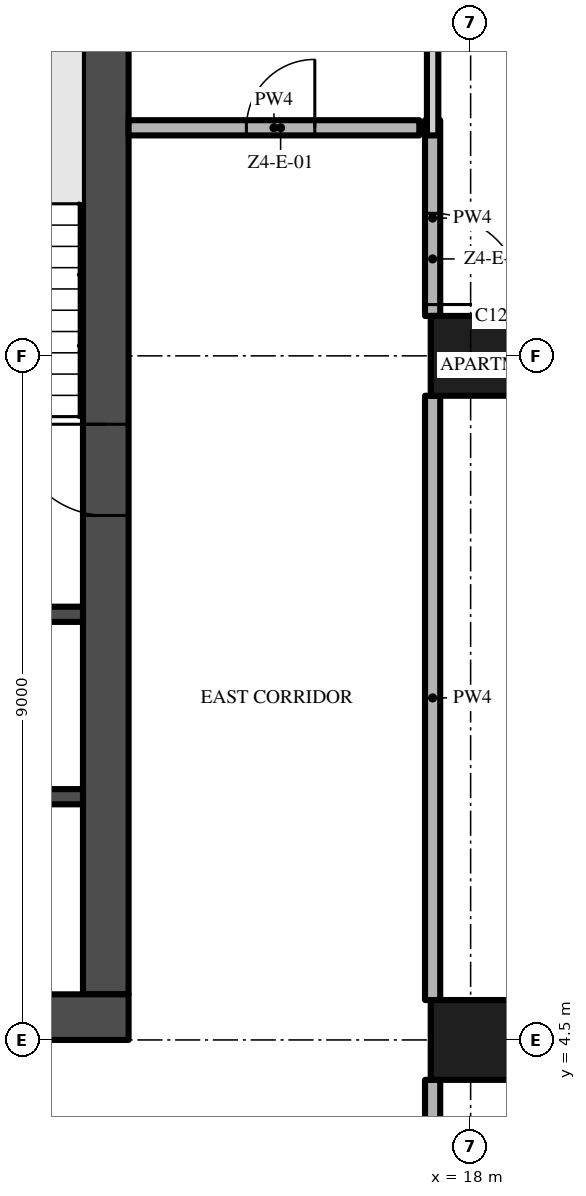
"""IFC4 building model, lengths in metres.
Left out: names, types, materials, properties, quantities, classifications, styles, units other than length and angle.
Written with IfcOpenShell. Run it as: python <this file> out.ifc"""

import sys

from ifc_helpers import new_model, si_unit, direction, frame, frame_2d, origin, origin_2d, place, context, subcontext, project, spatial, rectangle, extrude, element, fill, save


model = new_model("IFC4")
c1 = context("Model", 3, precision=1e-05, world=origin(), true_north=direction((0.0, 1.0)))
c2 = subcontext(c1, "Body", "Model", "MODEL_VIEW")
j1 = project(units=[si_unit("LENGTHUNIT", "METRE"), si_unit("PLANEANGLEUNIT", "RADIAN")], contexts=[c1])
p1 = place(None, origin())
s1 = spatial("IfcSite", under=j1, at=p1, CompositionType="ELEMENT")
p2 = place(p1, origin())
s2 = spatial("IfcBuilding", under=s1, at=p2, CompositionType="ELEMENT")
p3 = place(p2, frame((0.0, 0.0, 226.2)))
s3 = spatial("IfcBuildingStorey", under=s2, at=p3, CompositionType="ELEMENT", Elevation=226.2)
p4 = place(p3, frame((-13.5, 4.8, -0.3), z_axis=(0.0, 0.0, 1.0), x_axis=(1.0, 0.0, 0.0)))
e1 = element("IfcWall", 1, at=p4, inside=s3, PredefinedType="SHEAR", context=c2, shape_type="SweptSolid", body=[
    extrude(rectangle(XDim=27.0, YDim=0.6, at=frame_2d((13.5, 0.0))), origin(), (0.0, 0.0, 1.0), 3.8),
])
p5 = place(p4, frame((12.0, 0.0, 0.3)))
e2 = element("IfcOpeningElement", 2, at=p5, cuts=e1, PredefinedType="OPENING", context=c2, shape_type="SweptSolid", body=[
    extrude(rectangle(XDim=3.0, YDim=2.4, at=frame_2d((1.5, 1.2))), frame((0.0, 0.31, 0.0), z_axis=(0.0, -1.0, 0.0), x_axis=(1.0, 0.0, 0.0)), (0.0, 0.0, 1.0), 0.62),
])
p6 = place(p4, frame((4.9, 0.0, 0.3)))
e3 = element("IfcOpeningElement", 3, at=p6, cuts=e1, PredefinedType="OPENING", context=c2, shape_type="SweptSolid", body=[
    extrude(rectangle(XDim=1.2, YDim=2.2, at=frame_2d((0.6, 1.1))), frame((0.0, 0.31, 0.0), z_axis=(0.0, -1.0, 0.0), x_axis=(1.0, 0.0, 0.0)), (0.0, 0.0, 1.0), 0.62),
])
p7 = place(p4, frame((20.75, 0.0, 0.3)))
e4 = element("IfcOpeningElement", 4, at=p7, cuts=e1, PredefinedType="OPENING", context=c2, shape_type="SweptSolid", body=[
    extrude(rectangle(XDim=1.5, YDim=2.2, at=frame_2d((0.75, 1.1))), frame((0.0, 0.31, 0.0), z_axis=(0.0, -1.0, 0.0), x_axis=(1.0, 0.0, 0.0)), (0.0, 0.0, 1.0), 0.62),
])
p8 = place(p4, frame((17.4, 0.0, 0.3)))
e5 = element("IfcOpeningElement", 5, at=p8, cuts=e1, PredefinedType="OPENING", context=c2, shape_type="SweptSolid", body=[
    extrude(rectangle(XDim=1.2, YDim=2.2, at=frame_2d((0.6, 1.1))), frame((0.0, 0.31, 0.0), z_axis=(0.0, -1.0, 0.0), x_axis=(1.0, 0.0, 0.0)), (0.0, 0.0, 1.0), 0.62),
])
p9 = place(p3, frame((13.2, 5.1, -0.3), z_axis=(0.0, 0.0, 1.0), x_axis=(0.0, 1.0, 0.0)))
e6 = element("IfcWall", 6, at=p9, inside=s3, PredefinedType="SHEAR", context=c2, shape_type="SweptSolid", body=[
    extrude(rectangle(XDim=16.8, YDim=0.6, at=frame_2d((8.4, 0.0))), origin(), (0.0, 0.0, 1.0), 3.8),
])
p10 = place(p9, frame((6.3, 0.0, 0.3)))
e7 = element("IfcOpeningElement", 7, at=p10, cuts=e6, PredefinedType="OPENING", context=c2, shape_type="SweptSolid", body=[
    extrude(rectangle(XDim=1.2, YDim=2.2, at=frame_2d((0.6, 1.1))), frame((0.0, 0.31, 0.0), z_axis=(0.0, -1.0, 0.0), x_axis=(1.0, 0.0, 0.0)), (0.0, 0.0, 1.0), 0.62),
])
for number, where, z_axis, x_axis in (
    (8, (18.0, 13.5, 0.0), (0.0, 0.0, 1.0), (1.0, 0.0, 0.0)),
    (9, (18.0, 4.5, 0.0), (0.0, 0.0, 1.0), (1.0, 0.0, 0.0)),
):
    element("IfcColumn", number, at=place(p3, frame(where, z_axis=z_axis, x_axis=x_axis)), inside=s3, PredefinedType="COLUMN", context=c2, shape_type="SweptSolid", body=[
        extrude(rectangle(XDim=1.05, YDim=1.05, at=origin_2d()), origin(), (0.0, 0.0, 1.0), 3.5),
    ])
for number, where, z_axis, x_axis in (
    (10, (9.65, 7.7, 0.0), (0.0, 0.0, 1.0), (1.0, 0.0, 0.0)),
    (11, (9.65, 10.1, 0.0), (0.0, 0.0, 1.0), (1.0, 0.0, 0.0)),
):
    element("IfcWall", number, at=place(p3, frame(where, z_axis=z_axis, x_axis=x_axis)), inside=s3, PredefinedType="SHEAR", context=c2, shape_type="SweptSolid", body=[
        extrude(rectangle(XDim=3.25, YDim=0.2, at=frame_2d((1.625, 0.0))), origin(), (0.0, 0.0, 1.0), 3.5),
    ])
p11 = place(p3, frame((13.5, 16.5, 0.0), z_axis=(0.0, 0.0, 1.0), x_axis=(1.0, 0.0, 0.0)))
e12 = element("IfcWall", 12, at=p11, inside=s3, PredefinedType="PARTITIONING", context=c2, shape_type="SweptSolid", body=[
    extrude(rectangle(XDim=3.825, YDim=0.2, at=frame_2d((1.913, 0.0))), origin(), (0.0, 0.0, 1.0), 3.5),
])
p12 = place(p11, frame((1.55, 0.0, 0.0)))
e13 = element("IfcOpeningElement", 13, at=p12, cuts=e12, PredefinedType="OPENING", context=c2, shape_type="SweptSolid", body=[
    extrude(rectangle(XDim=0.9, YDim=2.1, at=frame_2d((0.45, 1.05))), frame((0.0, 0.11, 0.0), z_axis=(0.0, -1.0, 0.0), x_axis=(1.0, 0.0, 0.0)), (0.0, 0.0, 1.0), 0.22),
])
p13 = place(p3, frame((17.5, -0.2, 0.0), z_axis=(0.0, 0.0, 1.0), x_axis=(0.0, 1.0, 0.0)))
e14 = element("IfcWall", 14, at=p13, inside=s3, PredefinedType="PARTITIONING", context=c2, shape_type="SweptSolid", body=[
    extrude(rectangle(XDim=4.175, YDim=0.2, at=frame_2d((2.087, 0.0))), origin(), (0.0, 0.0, 1.0), 3.5),
])
p14 = place(p3, frame((17.5, 5.025, 0.0), z_axis=(0.0, 0.0, 1.0), x_axis=(0.0, 1.0, 0.0)))
e15 = element("IfcWall", 15, at=p14, inside=s3, PredefinedType="PARTITIONING", context=c2, shape_type="SweptSolid", body=[
    extrude(rectangle(XDim=7.95, YDim=0.2, at=frame_2d((3.975, 0.0))), origin(), (0.0, 0.0, 1.0), 3.5),
])
p15 = place(p3, frame((17.5, 16.6, 0.0), z_axis=(0.0, 0.0, 1.0), x_axis=(0.0, -1.0, 0.0)))
e16 = element("IfcWall", 16, at=p15, inside=s3, PredefinedType="PARTITIONING", context=c2, shape_type="SweptSolid", body=[
    extrude(rectangle(XDim=2.575, YDim=0.2, at=frame_2d((1.288, 0.0))), origin(), (0.0, 0.0, 1.0), 3.5),
])
p16 = place(p15, frame((1.225, 0.0, 0.0)))
e17 = element("IfcOpeningElement", 17, at=p16, cuts=e16, PredefinedType="OPENING", context=c2, shape_type="SweptSolid", body=[
    extrude(rectangle(XDim=1.2, YDim=2.4, at=frame_2d((0.6, 1.2))), frame((0.0, 0.11, 0.0), z_axis=(0.0, -1.0, 0.0), x_axis=(1.0, 0.0, 0.0)), (0.0, 0.0, 1.0), 0.22),
])
p17 = place(p3, frame((17.5, 16.4, 0.0), z_axis=(0.0, 0.0, 1.0), x_axis=(0.0, 1.0, 0.0)))
e18 = element("IfcWall", 18, at=p17, inside=s3, PredefinedType="PARTITIONING", context=c2, shape_type="SweptSolid", body=[
    extrude(rectangle(XDim=5.15, YDim=0.15, at=frame_2d((2.575, 0.0))), origin(), (0.0, 0.0, 1.0), 3.5),
])
p18 = place(p10, frame((1.2, 0.0, 0.0), z_axis=(0.0, 0.0, 1.0), x_axis=(-1.0, 0.0, 0.0)))
e19 = element("IfcDoor", 19, at=p18, inside=s3, OperationType="SINGLE_SWING_LEFT", PredefinedType="DOOR", context=c2, shape_type="SweptSolid", body=[
    extrude(rectangle(XDim=1.2, YDim=2.2, at=frame_2d((0.6, 1.1))), frame((0.0, 0.025, 0.0), z_axis=(0.0, -1.0, 0.0), x_axis=(1.0, 0.0, 0.0)), (0.0, 0.0, 1.0), 0.05),
])
fill(e7, e19)
p19 = place(p12, origin())
e20 = element("IfcDoor", 20, at=p19, inside=s3, OperationType="SINGLE_SWING_RIGHT", PredefinedType="DOOR", context=c2, shape_type="SweptSolid", body=[
    extrude(rectangle(XDim=0.9, YDim=2.1, at=frame_2d((0.45, 1.05))), frame((0.0, 0.025, 0.0), z_axis=(0.0, -1.0, 0.0), x_axis=(1.0, 0.0, 0.0)), (0.0, 0.0, 1.0), 0.05),
])
fill(e13, e20)
p20 = place(p16, origin())
e21 = element("IfcDoor", 21, at=p20, inside=s3, OperationType="SINGLE_SWING_RIGHT", PredefinedType="DOOR", context=c2, shape_type="SweptSolid", body=[
    extrude(rectangle(XDim=1.2, YDim=2.4, at=frame_2d((0.6, 1.2))), frame((0.0, 0.025, 0.0), z_axis=(0.0, -1.0, 0.0), x_axis=(1.0, 0.0, 0.0)), (0.0, 0.0, 1.0), 0.05),
])
fill(e17, e21)
save(model, sys.argv[1])
